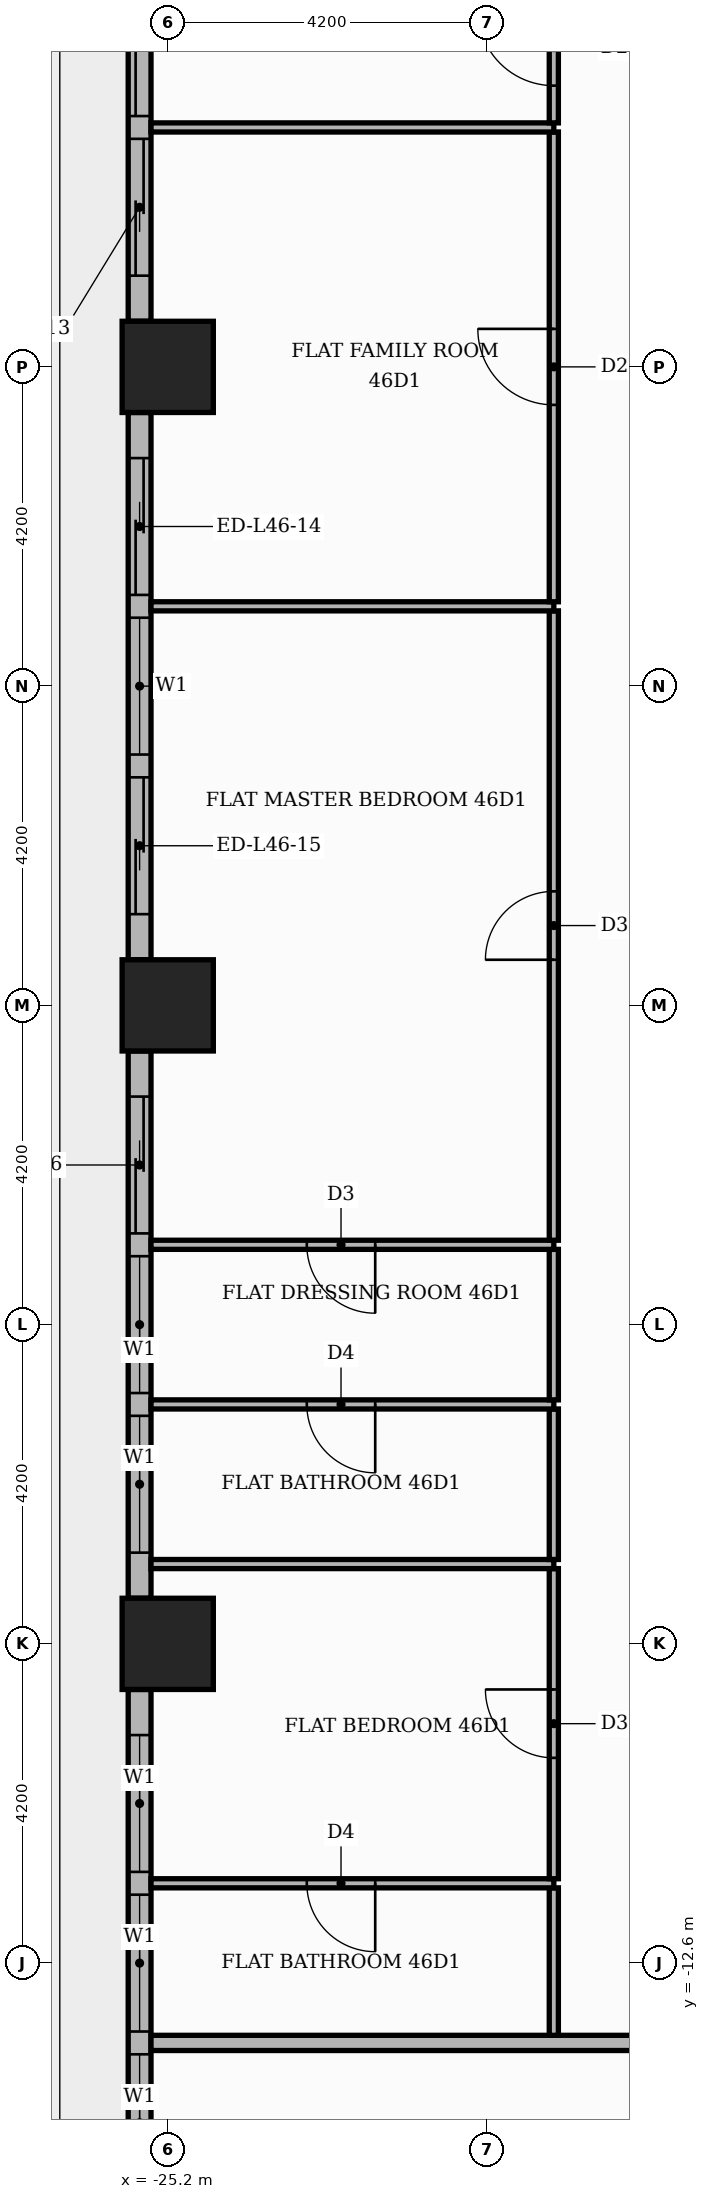
"""IFC4 building model, lengths in metres.
Left out: names, types, materials, properties, quantities, classifications, styles, units other than length and angle.
Written with IfcOpenShell. Run it as: python <this file> out.ifc"""

import sys

from ifc_helpers import new_model, si_unit, direction, frame, frame_2d, origin, origin_2d, place, context, subcontext, project, spatial, rectangle, extrude, element, fill, save


model = new_model("IFC4")
c1 = context("Model", 3, precision=1e-05, world=origin(), true_north=direction((0.0, 1.0)))
c2 = subcontext(c1, "Body", "Model", "MODEL_VIEW")
j1 = project(units=[si_unit("LENGTHUNIT", "METRE"), si_unit("PLANEANGLEUNIT", "RADIAN")], contexts=[c1])
p1 = place(None, origin())
s1 = spatial("IfcSite", under=j1, at=p1, CompositionType="ELEMENT")
p2 = place(p1, origin())
s2 = spatial("IfcBuilding", under=s1, at=p2, CompositionType="ELEMENT")
p3 = place(p2, frame((0.0, 0.0, 196.2)))
s3 = spatial("IfcBuildingStorey", under=s2, at=p3, CompositionType="ELEMENT", Elevation=196.2)
for number, where, z_axis, x_axis in (
    (1, (-25.2, 0.0, 0.0), (0.0, 0.0, 1.0), (1.0, 0.0, 0.0)),
    (2, (-25.2, -8.4, 0.0), (0.0, 0.0, 1.0), (1.0, 0.0, 0.0)),
    (3, (-25.2, 8.4, 0.0), (0.0, 0.0, 1.0), (1.0, 0.0, 0.0)),
):
    element("IfcColumn", number, at=place(p3, frame(where, z_axis=z_axis, x_axis=x_axis)), inside=s3, PredefinedType="COLUMN", context=c2, shape_type="SweptSolid", body=[
        extrude(rectangle(XDim=1.2, YDim=1.2, at=origin_2d()), origin(), (0.0, 0.0, 1.0), 3.9),
    ])
p4 = place(p3, frame((-25.57, 16.2, 0.0), z_axis=(0.0, 0.0, 1.0), x_axis=(0.0, -1.0, 0.0)))
e4 = element("IfcWall", 4, at=p4, inside=s3, PredefinedType="STANDARD", context=c2, shape_type="SweptSolid", body=[
    extrude(rectangle(XDim=7.2, YDim=0.3, at=frame_2d((3.6, 0.0))), origin(), (0.0, 0.0, 1.0), 3.48),
])
p5 = place(p4, frame((0.6, 0.0, 0.0)))
e5 = element("IfcOpeningElement", 5, at=p5, cuts=e4, PredefinedType="OPENING", context=c2, shape_type="SweptSolid", body=[
    extrude(rectangle(XDim=3.9, YDim=2.4, at=frame_2d((1.95, 1.2))), frame((0.0, 0.16, 0.0), z_axis=(0.0, -1.0, 0.0), x_axis=(1.0, 0.0, 0.0)), (0.0, 0.0, 1.0), 0.32),
])
p6 = place(p4, frame((4.8, 0.0, 0.0)))
e6 = element("IfcOpeningElement", 6, at=p6, cuts=e4, PredefinedType="OPENING", context=c2, shape_type="SweptSolid", body=[
    extrude(rectangle(XDim=1.8, YDim=2.4, at=frame_2d((0.9, 1.2))), frame((0.0, 0.16, 0.0), z_axis=(0.0, -1.0, 0.0), x_axis=(1.0, 0.0, 0.0)), (0.0, 0.0, 1.0), 0.32),
])
p7 = place(p3, frame((-25.57, 7.8, 0.0), z_axis=(0.0, 0.0, 1.0), x_axis=(0.0, -1.0, 0.0)))
e7 = element("IfcWall", 7, at=p7, inside=s3, PredefinedType="STANDARD", context=c2, shape_type="SweptSolid", body=[
    extrude(rectangle(XDim=7.2, YDim=0.3, at=frame_2d((3.6, 0.0))), origin(), (0.0, 0.0, 1.0), 3.48),
])
p8 = place(p7, frame((0.6, 0.0, 0.0)))
e8 = element("IfcOpeningElement", 8, at=p8, cuts=e7, PredefinedType="OPENING", context=c2, shape_type="SweptSolid", body=[
    extrude(rectangle(XDim=1.8, YDim=2.4, at=frame_2d((0.9, 1.2))), frame((0.0, 0.16, 0.0), z_axis=(0.0, -1.0, 0.0), x_axis=(1.0, 0.0, 0.0)), (0.0, 0.0, 1.0), 0.32),
])
p9 = place(p7, frame((2.7, 0.0, 0.9)))
e9 = element("IfcOpeningElement", 9, at=p9, cuts=e7, PredefinedType="OPENING", context=c2, shape_type="SweptSolid", body=[
    extrude(rectangle(XDim=1.8, YDim=2.1, at=frame_2d((0.9, 1.05))), frame((0.0, 0.16, 0.0), z_axis=(0.0, -1.0, 0.0), x_axis=(1.0, 0.0, 0.0)), (0.0, 0.0, 1.0), 0.32),
])
p10 = place(p7, frame((4.8, 0.0, 0.0)))
e10 = element("IfcOpeningElement", 10, at=p10, cuts=e7, PredefinedType="OPENING", context=c2, shape_type="SweptSolid", body=[
    extrude(rectangle(XDim=1.8, YDim=2.4, at=frame_2d((0.9, 1.2))), frame((0.0, 0.16, 0.0), z_axis=(0.0, -1.0, 0.0), x_axis=(1.0, 0.0, 0.0)), (0.0, 0.0, 1.0), 0.32),
])
p11 = place(p3, frame((-25.57, -0.6, 0.0), z_axis=(0.0, 0.0, 1.0), x_axis=(0.0, -1.0, 0.0)))
e11 = element("IfcWall", 11, at=p11, inside=s3, PredefinedType="STANDARD", context=c2, shape_type="SweptSolid", body=[
    extrude(rectangle(XDim=7.2, YDim=0.3, at=frame_2d((3.6, 0.0))), origin(), (0.0, 0.0, 1.0), 3.48),
])
p12 = place(p11, frame((0.6, 0.0, 0.0)))
e12 = element("IfcOpeningElement", 12, at=p12, cuts=e11, PredefinedType="OPENING", context=c2, shape_type="SweptSolid", body=[
    extrude(rectangle(XDim=1.8, YDim=2.4, at=frame_2d((0.9, 1.2))), frame((0.0, 0.16, 0.0), z_axis=(0.0, -1.0, 0.0), x_axis=(1.0, 0.0, 0.0)), (0.0, 0.0, 1.0), 0.32),
])
p13 = place(p11, frame((2.7, 0.0, 0.9)))
e13 = element("IfcOpeningElement", 13, at=p13, cuts=e11, PredefinedType="OPENING", context=c2, shape_type="SweptSolid", body=[
    extrude(rectangle(XDim=1.8, YDim=2.1, at=frame_2d((0.9, 1.05))), frame((0.0, 0.16, 0.0), z_axis=(0.0, -1.0, 0.0), x_axis=(1.0, 0.0, 0.0)), (0.0, 0.0, 1.0), 0.32),
])
p14 = place(p11, frame((4.8, 0.0, 0.9)))
e14 = element("IfcOpeningElement", 14, at=p14, cuts=e11, PredefinedType="OPENING", context=c2, shape_type="SweptSolid", body=[
    extrude(rectangle(XDim=1.8, YDim=2.1, at=frame_2d((0.9, 1.05))), frame((0.0, 0.16, 0.0), z_axis=(0.0, -1.0, 0.0), x_axis=(1.0, 0.0, 0.0)), (0.0, 0.0, 1.0), 0.32),
])
p15 = place(p3, frame((-25.57, -9.0, 0.0), z_axis=(0.0, 0.0, 1.0), x_axis=(0.0, -1.0, 0.0)))
e15 = element("IfcWall", 15, at=p15, inside=s3, PredefinedType="STANDARD", context=c2, shape_type="SweptSolid", body=[
    extrude(rectangle(XDim=7.2, YDim=0.3, at=frame_2d((3.6, 0.0))), origin(), (0.0, 0.0, 1.0), 3.48),
])
p16 = place(p15, frame((0.6, 0.0, 0.9)))
e16 = element("IfcOpeningElement", 16, at=p16, cuts=e15, PredefinedType="OPENING", context=c2, shape_type="SweptSolid", body=[
    extrude(rectangle(XDim=1.8, YDim=2.1, at=frame_2d((0.9, 1.05))), frame((0.0, 0.16, 0.0), z_axis=(0.0, -1.0, 0.0), x_axis=(1.0, 0.0, 0.0)), (0.0, 0.0, 1.0), 0.32),
])
p17 = place(p15, frame((2.7, 0.0, 0.9)))
e17 = element("IfcOpeningElement", 17, at=p17, cuts=e15, PredefinedType="OPENING", context=c2, shape_type="SweptSolid", body=[
    extrude(rectangle(XDim=1.8, YDim=2.1, at=frame_2d((0.9, 1.05))), frame((0.0, 0.16, 0.0), z_axis=(0.0, -1.0, 0.0), x_axis=(1.0, 0.0, 0.0)), (0.0, 0.0, 1.0), 0.32),
])
p18 = place(p15, frame((4.8, 0.0, 0.9)))
e18 = element("IfcOpeningElement", 18, at=p18, cuts=e15, PredefinedType="OPENING", context=c2, shape_type="SweptSolid", body=[
    extrude(rectangle(XDim=1.8, YDim=2.1, at=frame_2d((0.9, 1.05))), frame((0.0, 0.16, 0.0), z_axis=(0.0, -1.0, 0.0), x_axis=(1.0, 0.0, 0.0)), (0.0, 0.0, 1.0), 0.32),
])
p19 = place(p3, frame((-25.42, -13.65, 0.0), z_axis=(0.0, 0.0, 1.0), x_axis=(1.0, 0.0, 0.0)))
e19 = element("IfcWall", 19, at=p19, inside=s3, PredefinedType="PARTITIONING", context=c2, shape_type="SweptSolid", body=[
    extrude(rectangle(XDim=39.07, YDim=0.2, at=frame_2d((19.535, 0.0))), origin(), (0.0, 0.0, 1.0), 3.48),
])
p20 = place(p19, frame((14.37, 0.0, 0.0)))
e20 = element("IfcOpeningElement", 20, at=p20, cuts=e19, PredefinedType="OPENING", context=c2, shape_type="SweptSolid", body=[
    extrude(rectangle(XDim=1.1, YDim=2.4, at=frame_2d((0.55, 1.2))), frame((0.0, 0.11, 0.0), z_axis=(0.0, -1.0, 0.0), x_axis=(1.0, 0.0, 0.0)), (0.0, 0.0, 1.0), 0.22),
])
p21 = place(p3, frame((-20.12, -13.55, 0.0), z_axis=(0.0, 0.0, 1.0), x_axis=(0.0, 1.0, 0.0)))
e21 = element("IfcWall", 21, at=p21, inside=s3, PredefinedType="PARTITIONING", context=c2, shape_type="SweptSolid", body=[
    extrude(rectangle(XDim=1.94, YDim=0.12, at=frame_2d((0.97, 0.0))), origin(), (0.0, 0.0, 1.0), 3.48),
])
p22 = place(p3, frame((-25.42, -11.55, 0.0), z_axis=(0.0, 0.0, 1.0), x_axis=(1.0, 0.0, 0.0)))
e22 = element("IfcWall", 22, at=p22, inside=s3, PredefinedType="PARTITIONING", context=c2, shape_type="SweptSolid", body=[
    extrude(rectangle(XDim=5.3, YDim=0.12, at=frame_2d((2.65, 0.0))), origin(), (0.0, 0.0, 1.0), 3.48),
])
p23 = place(p22, frame((2.05, 0.0, 0.0)))
e23 = element("IfcOpeningElement", 23, at=p23, cuts=e22, PredefinedType="OPENING", context=c2, shape_type="SweptSolid", body=[
    extrude(rectangle(XDim=0.9, YDim=2.1, at=frame_2d((0.45, 1.05))), frame((0.0, 0.07, 0.0), z_axis=(0.0, -1.0, 0.0), x_axis=(1.0, 0.0, 0.0)), (0.0, 0.0, 1.0), 0.14),
])
p24 = place(p3, frame((-20.12, -11.49, 0.0), z_axis=(0.0, 0.0, 1.0), x_axis=(0.0, 1.0, 0.0)))
e24 = element("IfcWall", 24, at=p24, inside=s3, PredefinedType="PARTITIONING", context=c2, shape_type="SweptSolid", body=[
    extrude(rectangle(XDim=4.08, YDim=0.12, at=frame_2d((2.04, 0.0))), origin(), (0.0, 0.0, 1.0), 3.48),
])
p25 = place(p24, frame((1.59, 0.0, 0.0)))
e25 = element("IfcOpeningElement", 25, at=p25, cuts=e24, PredefinedType="OPENING", context=c2, shape_type="SweptSolid", body=[
    extrude(rectangle(XDim=0.9, YDim=2.1, at=frame_2d((0.45, 1.05))), frame((0.0, 0.07, 0.0), z_axis=(0.0, -1.0, 0.0), x_axis=(1.0, 0.0, 0.0)), (0.0, 0.0, 1.0), 0.14),
])
p26 = place(p3, frame((-25.42, -7.35, 0.0), z_axis=(0.0, 0.0, 1.0), x_axis=(1.0, 0.0, 0.0)))
e26 = element("IfcWall", 26, at=p26, inside=s3, PredefinedType="PARTITIONING", context=c2, shape_type="SweptSolid", body=[
    extrude(rectangle(XDim=5.3, YDim=0.12, at=frame_2d((2.65, 0.0))), origin(), (0.0, 0.0, 1.0), 3.48),
])
p27 = place(p3, frame((-20.12, -7.29, 0.0), z_axis=(0.0, 0.0, 1.0), x_axis=(0.0, 1.0, 0.0)))
e27 = element("IfcWall", 27, at=p27, inside=s3, PredefinedType="PARTITIONING", context=c2, shape_type="SweptSolid", body=[
    extrude(rectangle(XDim=1.98, YDim=0.12, at=frame_2d((0.99, 0.0))), origin(), (0.0, 0.0, 1.0), 3.48),
])
p28 = place(p3, frame((-25.42, -5.25, 0.0), z_axis=(0.0, 0.0, 1.0), x_axis=(1.0, 0.0, 0.0)))
e28 = element("IfcWall", 28, at=p28, inside=s3, PredefinedType="PARTITIONING", context=c2, shape_type="SweptSolid", body=[
    extrude(rectangle(XDim=5.3, YDim=0.12, at=frame_2d((2.65, 0.0))), origin(), (0.0, 0.0, 1.0), 3.48),
])
p29 = place(p28, frame((2.05, 0.0, 0.0)))
e29 = element("IfcOpeningElement", 29, at=p29, cuts=e28, PredefinedType="OPENING", context=c2, shape_type="SweptSolid", body=[
    extrude(rectangle(XDim=0.9, YDim=2.1, at=frame_2d((0.45, 1.05))), frame((0.0, 0.07, 0.0), z_axis=(0.0, -1.0, 0.0), x_axis=(1.0, 0.0, 0.0)), (0.0, 0.0, 1.0), 0.14),
])
p30 = place(p3, frame((-20.12, -5.19, 0.0), z_axis=(0.0, 0.0, 1.0), x_axis=(0.0, 1.0, 0.0)))
e30 = element("IfcWall", 30, at=p30, inside=s3, PredefinedType="PARTITIONING", context=c2, shape_type="SweptSolid", body=[
    extrude(rectangle(XDim=1.98, YDim=0.12, at=frame_2d((0.99, 0.0))), origin(), (0.0, 0.0, 1.0), 3.48),
])
p31 = place(p3, frame((-25.42, -3.15, 0.0), z_axis=(0.0, 0.0, 1.0), x_axis=(1.0, 0.0, 0.0)))
e31 = element("IfcWall", 31, at=p31, inside=s3, PredefinedType="PARTITIONING", context=c2, shape_type="SweptSolid", body=[
    extrude(rectangle(XDim=5.3, YDim=0.12, at=frame_2d((2.65, 0.0))), origin(), (0.0, 0.0, 1.0), 3.48),
])
p32 = place(p31, frame((2.05, 0.0, 0.0)))
e32 = element("IfcOpeningElement", 32, at=p32, cuts=e31, PredefinedType="OPENING", context=c2, shape_type="SweptSolid", body=[
    extrude(rectangle(XDim=0.9, YDim=2.1, at=frame_2d((0.45, 1.05))), frame((0.0, 0.07, 0.0), z_axis=(0.0, -1.0, 0.0), x_axis=(1.0, 0.0, 0.0)), (0.0, 0.0, 1.0), 0.14),
])
p33 = place(p3, frame((-20.12, -3.09, 0.0), z_axis=(0.0, 0.0, 1.0), x_axis=(0.0, 1.0, 0.0)))
e33 = element("IfcWall", 33, at=p33, inside=s3, PredefinedType="PARTITIONING", context=c2, shape_type="SweptSolid", body=[
    extrude(rectangle(XDim=8.28, YDim=0.12, at=frame_2d((4.14, 0.0))), origin(), (0.0, 0.0, 1.0), 3.48),
])
p34 = place(p33, frame((3.69, 0.0, 0.0)))
e34 = element("IfcOpeningElement", 34, at=p34, cuts=e33, PredefinedType="OPENING", context=c2, shape_type="SweptSolid", body=[
    extrude(rectangle(XDim=0.9, YDim=2.1, at=frame_2d((0.45, 1.05))), frame((0.0, 0.07, 0.0), z_axis=(0.0, -1.0, 0.0), x_axis=(1.0, 0.0, 0.0)), (0.0, 0.0, 1.0), 0.14),
])
p35 = place(p3, frame((-25.42, 5.25, 0.0), z_axis=(0.0, 0.0, 1.0), x_axis=(1.0, 0.0, 0.0)))
e35 = element("IfcWall", 35, at=p35, inside=s3, PredefinedType="PARTITIONING", context=c2, shape_type="SweptSolid", body=[
    extrude(rectangle(XDim=5.3, YDim=0.12, at=frame_2d((2.65, 0.0))), origin(), (0.0, 0.0, 1.0), 3.48),
])
p36 = place(p3, frame((-20.12, 5.31, 0.0), z_axis=(0.0, 0.0, 1.0), x_axis=(0.0, 1.0, 0.0)))
e36 = element("IfcWall", 36, at=p36, inside=s3, PredefinedType="PARTITIONING", context=c2, shape_type="SweptSolid", body=[
    extrude(rectangle(XDim=6.18, YDim=0.12, at=frame_2d((3.09, 0.0))), origin(), (0.0, 0.0, 1.0), 3.48),
])
p37 = place(p36, frame((2.59, 0.0, 0.0)))
e37 = element("IfcOpeningElement", 37, at=p37, cuts=e36, PredefinedType="OPENING", context=c2, shape_type="SweptSolid", body=[
    extrude(rectangle(XDim=1.0, YDim=2.1, at=frame_2d((0.5, 1.05))), frame((0.0, 0.07, 0.0), z_axis=(0.0, -1.0, 0.0), x_axis=(1.0, 0.0, 0.0)), (0.0, 0.0, 1.0), 0.14),
])
p38 = place(p3, frame((-25.42, 11.55, 0.0), z_axis=(0.0, 0.0, 1.0), x_axis=(1.0, 0.0, 0.0)))
e38 = element("IfcWall", 38, at=p38, inside=s3, PredefinedType="PARTITIONING", context=c2, shape_type="SweptSolid", body=[
    extrude(rectangle(XDim=5.3, YDim=0.12, at=frame_2d((2.65, 0.0))), origin(), (0.0, 0.0, 1.0), 3.48),
])
p39 = place(p3, frame((-20.12, 11.61, 0.0), z_axis=(0.0, 0.0, 1.0), x_axis=(0.0, 1.0, 0.0)))
e39 = element("IfcWall", 39, at=p39, inside=s3, PredefinedType="PARTITIONING", context=c2, shape_type="SweptSolid", body=[
    extrude(rectangle(XDim=1.98, YDim=0.12, at=frame_2d((0.99, 0.0))), origin(), (0.0, 0.0, 1.0), 3.48),
])
p40 = place(p39, frame((0.49, 0.0, 0.0)))
e40 = element("IfcOpeningElement", 40, at=p40, cuts=e39, PredefinedType="OPENING", context=c2, shape_type="SweptSolid", body=[
    extrude(rectangle(XDim=1.0, YDim=2.1, at=frame_2d((0.5, 1.05))), frame((0.0, 0.07, 0.0), z_axis=(0.0, -1.0, 0.0), x_axis=(1.0, 0.0, 0.0)), (0.0, 0.0, 1.0), 0.14),
])
p41 = place(p5, origin())
e41 = element("IfcDoor", 41, at=p41, inside=s3, OperationType="SLIDING_TO_LEFT", PredefinedType="DOOR", context=c2, shape_type="SweptSolid", body=[
    extrude(rectangle(XDim=3.9, YDim=2.4, at=frame_2d((1.95, 1.2))), frame((0.0, 0.025, 0.0), z_axis=(0.0, -1.0, 0.0), x_axis=(1.0, 0.0, 0.0)), (0.0, 0.0, 1.0), 0.05),
])
fill(e5, e41)
p42 = place(p6, origin())
e42 = element("IfcDoor", 42, at=p42, inside=s3, OperationType="SLIDING_TO_RIGHT", PredefinedType="DOOR", context=c2, shape_type="SweptSolid", body=[
    extrude(rectangle(XDim=1.8, YDim=2.4, at=frame_2d((0.9, 1.2))), frame((0.0, 0.025, 0.0), z_axis=(0.0, -1.0, 0.0), x_axis=(1.0, 0.0, 0.0)), (0.0, 0.0, 1.0), 0.05),
])
fill(e6, e42)
p43 = place(p8, origin())
e43 = element("IfcDoor", 43, at=p43, inside=s3, OperationType="SLIDING_TO_LEFT", PredefinedType="DOOR", context=c2, shape_type="SweptSolid", body=[
    extrude(rectangle(XDim=1.8, YDim=2.4, at=frame_2d((0.9, 1.2))), frame((0.0, 0.025, 0.0), z_axis=(0.0, -1.0, 0.0), x_axis=(1.0, 0.0, 0.0)), (0.0, 0.0, 1.0), 0.05),
])
fill(e8, e43)
p44 = place(p9, origin())
e44 = element("IfcWindow", 44, at=p44, inside=s3, PartitioningType="SINGLE_PANEL", PredefinedType="WINDOW", context=c2, shape_type="SweptSolid", body=[
    extrude(rectangle(XDim=1.8, YDim=2.1, at=frame_2d((0.9, 1.05))), frame((0.0, 0.03, 0.0), z_axis=(0.0, -1.0, 0.0), x_axis=(1.0, 0.0, 0.0)), (0.0, 0.0, 1.0), 0.06),
])
fill(e9, e44)
p45 = place(p10, origin())
e45 = element("IfcDoor", 45, at=p45, inside=s3, OperationType="SLIDING_TO_RIGHT", PredefinedType="DOOR", context=c2, shape_type="SweptSolid", body=[
    extrude(rectangle(XDim=1.8, YDim=2.4, at=frame_2d((0.9, 1.2))), frame((0.0, 0.025, 0.0), z_axis=(0.0, -1.0, 0.0), x_axis=(1.0, 0.0, 0.0)), (0.0, 0.0, 1.0), 0.05),
])
fill(e10, e45)
p46 = place(p12, origin())
e46 = element("IfcDoor", 46, at=p46, inside=s3, OperationType="SLIDING_TO_LEFT", PredefinedType="DOOR", context=c2, shape_type="SweptSolid", body=[
    extrude(rectangle(XDim=1.8, YDim=2.4, at=frame_2d((0.9, 1.2))), frame((0.0, 0.025, 0.0), z_axis=(0.0, -1.0, 0.0), x_axis=(1.0, 0.0, 0.0)), (0.0, 0.0, 1.0), 0.05),
])
fill(e12, e46)
p47 = place(p13, origin())
e47 = element("IfcWindow", 47, at=p47, inside=s3, PartitioningType="SINGLE_PANEL", PredefinedType="WINDOW", context=c2, shape_type="SweptSolid", body=[
    extrude(rectangle(XDim=1.8, YDim=2.1, at=frame_2d((0.9, 1.05))), frame((0.0, 0.03, 0.0), z_axis=(0.0, -1.0, 0.0), x_axis=(1.0, 0.0, 0.0)), (0.0, 0.0, 1.0), 0.06),
])
fill(e13, e47)
p48 = place(p14, origin())
e48 = element("IfcWindow", 48, at=p48, inside=s3, PartitioningType="SINGLE_PANEL", PredefinedType="WINDOW", context=c2, shape_type="SweptSolid", body=[
    extrude(rectangle(XDim=1.8, YDim=2.1, at=frame_2d((0.9, 1.05))), frame((0.0, 0.03, 0.0), z_axis=(0.0, -1.0, 0.0), x_axis=(1.0, 0.0, 0.0)), (0.0, 0.0, 1.0), 0.06),
])
fill(e14, e48)
p49 = place(p16, origin())
e49 = element("IfcWindow", 49, at=p49, inside=s3, PartitioningType="SINGLE_PANEL", PredefinedType="WINDOW", context=c2, shape_type="SweptSolid", body=[
    extrude(rectangle(XDim=1.8, YDim=2.1, at=frame_2d((0.9, 1.05))), frame((0.0, 0.03, 0.0), z_axis=(0.0, -1.0, 0.0), x_axis=(1.0, 0.0, 0.0)), (0.0, 0.0, 1.0), 0.06),
])
fill(e16, e49)
p50 = place(p17, origin())
e50 = element("IfcWindow", 50, at=p50, inside=s3, PartitioningType="SINGLE_PANEL", PredefinedType="WINDOW", context=c2, shape_type="SweptSolid", body=[
    extrude(rectangle(XDim=1.8, YDim=2.1, at=frame_2d((0.9, 1.05))), frame((0.0, 0.03, 0.0), z_axis=(0.0, -1.0, 0.0), x_axis=(1.0, 0.0, 0.0)), (0.0, 0.0, 1.0), 0.06),
])
fill(e17, e50)
p51 = place(p18, origin())
e51 = element("IfcWindow", 51, at=p51, inside=s3, PartitioningType="SINGLE_PANEL", PredefinedType="WINDOW", context=c2, shape_type="SweptSolid", body=[
    extrude(rectangle(XDim=1.8, YDim=2.1, at=frame_2d((0.9, 1.05))), frame((0.0, 0.03, 0.0), z_axis=(0.0, -1.0, 0.0), x_axis=(1.0, 0.0, 0.0)), (0.0, 0.0, 1.0), 0.06),
])
fill(e18, e51)
p52 = place(p40, origin())
e52 = element("IfcDoor", 52, at=p52, inside=s3, OperationType="SINGLE_SWING_RIGHT", PredefinedType="DOOR", context=c2, shape_type="SweptSolid", body=[
    extrude(rectangle(XDim=1.0, YDim=2.1, at=frame_2d((0.5, 1.05))), frame((0.0, 0.025, 0.0), z_axis=(0.0, -1.0, 0.0), x_axis=(1.0, 0.0, 0.0)), (0.0, 0.0, 1.0), 0.05),
])
fill(e40, e52)
p53 = place(p37, origin())
e53 = element("IfcDoor", 53, at=p53, inside=s3, OperationType="SINGLE_SWING_RIGHT", PredefinedType="DOOR", context=c2, shape_type="SweptSolid", body=[
    extrude(rectangle(XDim=1.0, YDim=2.1, at=frame_2d((0.5, 1.05))), frame((0.0, 0.025, 0.0), z_axis=(0.0, -1.0, 0.0), x_axis=(1.0, 0.0, 0.0)), (0.0, 0.0, 1.0), 0.05),
])
fill(e37, e53)
p54 = place(p34, origin())
e54 = element("IfcDoor", 54, at=p54, inside=s3, OperationType="SINGLE_SWING_LEFT", PredefinedType="DOOR", context=c2, shape_type="SweptSolid", body=[
    extrude(rectangle(XDim=0.9, YDim=2.1, at=frame_2d((0.45, 1.05))), frame((0.0, 0.025, 0.0), z_axis=(0.0, -1.0, 0.0), x_axis=(1.0, 0.0, 0.0)), (0.0, 0.0, 1.0), 0.05),
])
fill(e34, e54)
p55 = place(p32, frame((0.9, 0.0, 0.0), z_axis=(0.0, 0.0, 1.0), x_axis=(-1.0, 0.0, 0.0)))
e55 = element("IfcDoor", 55, at=p55, inside=s3, OperationType="SINGLE_SWING_RIGHT", PredefinedType="DOOR", context=c2, shape_type="SweptSolid", body=[
    extrude(rectangle(XDim=0.9, YDim=2.1, at=frame_2d((0.45, 1.05))), frame((0.0, 0.025, 0.0), z_axis=(0.0, -1.0, 0.0), x_axis=(1.0, 0.0, 0.0)), (0.0, 0.0, 1.0), 0.05),
])
fill(e32, e55)
p56 = place(p29, frame((0.9, 0.0, 0.0), z_axis=(0.0, 0.0, 1.0), x_axis=(-1.0, 0.0, 0.0)))
e56 = element("IfcDoor", 56, at=p56, inside=s3, OperationType="SINGLE_SWING_RIGHT", PredefinedType="DOOR", context=c2, shape_type="SweptSolid", body=[
    extrude(rectangle(XDim=0.9, YDim=2.1, at=frame_2d((0.45, 1.05))), frame((0.0, 0.025, 0.0), z_axis=(0.0, -1.0, 0.0), x_axis=(1.0, 0.0, 0.0)), (0.0, 0.0, 1.0), 0.05),
])
fill(e29, e56)
p57 = place(p25, origin())
e57 = element("IfcDoor", 57, at=p57, inside=s3, OperationType="SINGLE_SWING_RIGHT", PredefinedType="DOOR", context=c2, shape_type="SweptSolid", body=[
    extrude(rectangle(XDim=0.9, YDim=2.1, at=frame_2d((0.45, 1.05))), frame((0.0, 0.025, 0.0), z_axis=(0.0, -1.0, 0.0), x_axis=(1.0, 0.0, 0.0)), (0.0, 0.0, 1.0), 0.05),
])
fill(e25, e57)
p58 = place(p23, frame((0.9, 0.0, 0.0), z_axis=(0.0, 0.0, 1.0), x_axis=(-1.0, 0.0, 0.0)))
e58 = element("IfcDoor", 58, at=p58, inside=s3, OperationType="SINGLE_SWING_RIGHT", PredefinedType="DOOR", context=c2, shape_type="SweptSolid", body=[
    extrude(rectangle(XDim=0.9, YDim=2.1, at=frame_2d((0.45, 1.05))), frame((0.0, 0.025, 0.0), z_axis=(0.0, -1.0, 0.0), x_axis=(1.0, 0.0, 0.0)), (0.0, 0.0, 1.0), 0.05),
])
fill(e23, e58)
save(model, sys.argv[1])
